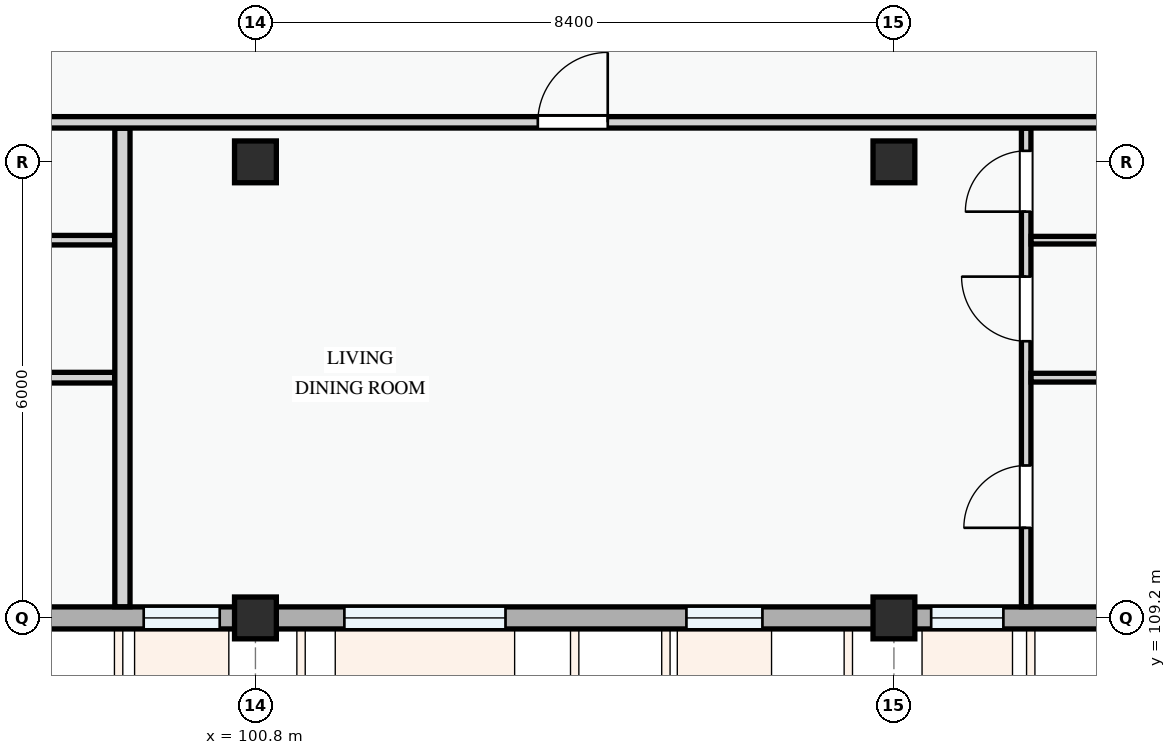
"""IFC4 building model, lengths in metres.
Left out: names, types, materials, properties, quantities, classifications, styles, units other than length and angle.
Written with IfcOpenShell. Run it as: python <this file> out.ifc"""

import sys

from ifc_helpers import new_model, si_unit, direction, frame, frame_2d, origin, origin_2d, place, context, subcontext, project, spatial, rectangle, extrude, element, fill, save


model = new_model("IFC4")
c1 = context("Model", 3, precision=1e-05, world=origin(), true_north=direction((0.0, 1.0)))
c2 = subcontext(c1, "Body", "Model", "MODEL_VIEW")
j1 = project(units=[si_unit("LENGTHUNIT", "METRE"), si_unit("PLANEANGLEUNIT", "RADIAN")], contexts=[c1])
p1 = place(None, origin())
s1 = spatial("IfcSite", under=j1, at=p1, CompositionType="ELEMENT")
p2 = place(p1, origin())
s2 = spatial("IfcBuilding", under=s1, at=p2, CompositionType="ELEMENT")
p3 = place(p2, frame((0.0, 0.0, 24.6)))
s3 = spatial("IfcBuildingStorey", under=s2, at=p3, CompositionType="ELEMENT", Elevation=24.6)
for number, where, z_axis, x_axis in (
    (1, (100.8, 109.2, 0.0), (0.0, 0.0, 1.0), (1.0, 0.0, 0.0)),
    (2, (100.8, 115.2, 0.0), (0.0, 0.0, 1.0), (1.0, 0.0, 0.0)),
    (3, (109.2, 109.2, 0.0), (0.0, 0.0, 1.0), (1.0, 0.0, 0.0)),
    (4, (109.2, 115.2, 0.0), (0.0, 0.0, 1.0), (1.0, 0.0, 0.0)),
):
    element("IfcColumn", number, at=place(p3, frame(where, z_axis=z_axis, x_axis=x_axis)), inside=s3, PredefinedType="COLUMN", context=c2, shape_type="SweptSolid", body=[
        extrude(rectangle(XDim=0.55, YDim=0.55, at=origin_2d()), origin(), (0.0, 0.0, 1.0), 3.3),
    ])
p4 = place(p3, frame((94.8, 109.2, 0.0), z_axis=(0.0, 0.0, 1.0), x_axis=(1.0, 0.0, 0.0)))
e5 = element("IfcWall", 5, at=p4, inside=s3, PredefinedType="STANDARD", context=c2, shape_type="SweptSolid", body=[
    extrude(rectangle(XDim=6.0, YDim=0.29, at=frame_2d((3.0, 0.0))), origin(), (0.0, 0.0, 1.0), 2.475),
])
p5 = place(p4, frame((1.62, 0.0, 0.78)))
e6 = element("IfcOpeningElement", 6, at=p5, cuts=e5, PredefinedType="OPENING", context=c2, shape_type="SweptSolid", body=[
    extrude(rectangle(XDim=1.2, YDim=1.35, at=frame_2d((0.6, 0.675))), frame((0.0, 0.155, 0.0), z_axis=(0.0, -1.0, 0.0), x_axis=(1.0, 0.0, 0.0)), (0.0, 0.0, 1.0), 0.31),
])
p6 = place(p4, frame((4.53, 0.0, 0.78)))
e7 = element("IfcOpeningElement", 7, at=p6, cuts=e5, PredefinedType="OPENING", context=c2, shape_type="SweptSolid", body=[
    extrude(rectangle(XDim=1.0, YDim=1.25, at=frame_2d((0.5, 0.625))), frame((0.0, 0.155, 0.0), z_axis=(0.0, -1.0, 0.0), x_axis=(1.0, 0.0, 0.0)), (0.0, 0.0, 1.0), 0.31),
])
p7 = place(p3, frame((100.8, 109.2, 0.0), z_axis=(0.0, 0.0, 1.0), x_axis=(1.0, 0.0, 0.0)))
e8 = element("IfcWall", 8, at=p7, inside=s3, PredefinedType="STANDARD", context=c2, shape_type="SweptSolid", body=[
    extrude(rectangle(XDim=8.4, YDim=0.29, at=frame_2d((4.2, 0.0))), origin(), (0.0, 0.0, 1.0), 2.375),
])
p8 = place(p7, frame((1.17, 0.0, 0.78)))
e9 = element("IfcOpeningElement", 9, at=p8, cuts=e8, PredefinedType="OPENING", context=c2, shape_type="SweptSolid", body=[
    extrude(rectangle(XDim=2.12, YDim=1.44, at=frame_2d((1.06, 0.72))), frame((0.0, 0.155, 0.0), z_axis=(0.0, -1.0, 0.0), x_axis=(1.0, 0.0, 0.0)), (0.0, 0.0, 1.0), 0.31),
])
p9 = place(p7, frame((5.67, 0.0, 0.78)))
e10 = element("IfcOpeningElement", 10, at=p9, cuts=e8, PredefinedType="OPENING", context=c2, shape_type="SweptSolid", body=[
    extrude(rectangle(XDim=1.0, YDim=1.25, at=frame_2d((0.5, 0.625))), frame((0.0, 0.155, 0.0), z_axis=(0.0, -1.0, 0.0), x_axis=(1.0, 0.0, 0.0)), (0.0, 0.0, 1.0), 0.31),
])
p10 = place(p3, frame((109.2, 109.2, 0.0), z_axis=(0.0, 0.0, 1.0), x_axis=(1.0, 0.0, 0.0)))
e11 = element("IfcWall", 11, at=p10, inside=s3, PredefinedType="STANDARD", context=c2, shape_type="SweptSolid", body=[
    extrude(rectangle(XDim=6.0, YDim=0.29, at=frame_2d((3.0, 0.0))), origin(), (0.0, 0.0, 1.0), 2.475),
])
p11 = place(p10, frame((0.49, 0.0, 0.78)))
e12 = element("IfcOpeningElement", 12, at=p11, cuts=e11, PredefinedType="OPENING", context=c2, shape_type="SweptSolid", body=[
    extrude(rectangle(XDim=0.95, YDim=1.15, at=frame_2d((0.475, 0.575))), frame((0.0, 0.155, 0.0), z_axis=(0.0, -1.0, 0.0), x_axis=(1.0, 0.0, 0.0)), (0.0, 0.0, 1.0), 0.31),
])
p12 = place(p10, frame((2.975, 0.0, 0.78)))
e13 = element("IfcOpeningElement", 13, at=p12, cuts=e11, PredefinedType="OPENING", context=c2, shape_type="SweptSolid", body=[
    extrude(rectangle(XDim=1.6, YDim=1.55, at=frame_2d((0.8, 0.775))), frame((0.0, 0.155, 0.0), z_axis=(0.0, -1.0, 0.0), x_axis=(1.0, 0.0, 0.0)), (0.0, 0.0, 1.0), 0.31),
])
p13 = place(p3, frame((89.807, 112.361, 0.0), z_axis=(0.0, 0.0, 1.0), x_axis=(1.0, 0.0, 0.0)))
e14 = element("IfcWall", 14, at=p13, inside=s3, PredefinedType="PARTITIONING", context=c2, shape_type="SweptSolid", body=[
    extrude(rectangle(XDim=9.141, YDim=0.14, at=frame_2d((4.571, 0.0))), origin(), (0.0, 0.0, 1.0), 3.0),
])
p14 = place(p3, frame((89.807, 114.17, 0.0), z_axis=(0.0, 0.0, 1.0), x_axis=(1.0, 0.0, 0.0)))
e15 = element("IfcWall", 15, at=p14, inside=s3, PredefinedType="PARTITIONING", context=c2, shape_type="SweptSolid", body=[
    extrude(rectangle(XDim=9.141, YDim=0.125, at=frame_2d((4.571, 0.0))), origin(), (0.0, 0.0, 1.0), 3.0),
])
p15 = place(p3, frame((110.94, 109.347, 0.0), z_axis=(0.0, 0.0, 1.0), x_axis=(0.0, 1.0, 0.0)))
e16 = element("IfcWall", 16, at=p15, inside=s3, PredefinedType="PARTITIONING", context=c2, shape_type="SweptSolid", body=[
    extrude(rectangle(XDim=6.296, YDim=0.125, at=frame_2d((3.148, 0.0))), origin(), (0.0, 0.0, 1.0), 3.0),
])
p16 = place(p15, frame((1.038, 0.0, 0.0)))
e17 = element("IfcOpeningElement", 17, at=p16, cuts=e16, PredefinedType="OPENING", context=c2, shape_type="SweptSolid", body=[
    extrude(rectangle(XDim=0.82, YDim=2.08, at=frame_2d((0.41, 1.04))), frame((0.0, 0.073, 0.0), z_axis=(0.0, -1.0, 0.0), x_axis=(1.0, 0.0, 0.0)), (0.0, 0.0, 1.0), 0.145),
])
p17 = place(p15, frame((3.493, 0.0, 0.0)))
e18 = element("IfcOpeningElement", 18, at=p17, cuts=e16, PredefinedType="OPENING", context=c2, shape_type="SweptSolid", body=[
    extrude(rectangle(XDim=0.85, YDim=2.1, at=frame_2d((0.425, 1.05))), frame((0.0, 0.073, 0.0), z_axis=(0.0, -1.0, 0.0), x_axis=(1.0, 0.0, 0.0)), (0.0, 0.0, 1.0), 0.145),
])
p18 = place(p15, frame((5.198, 0.0, 0.0)))
e19 = element("IfcOpeningElement", 19, at=p18, cuts=e16, PredefinedType="OPENING", context=c2, shape_type="SweptSolid", body=[
    extrude(rectangle(XDim=0.8, YDim=2.1, at=frame_2d((0.4, 1.05))), frame((0.0, 0.073, 0.0), z_axis=(0.0, -1.0, 0.0), x_axis=(1.0, 0.0, 0.0)), (0.0, 0.0, 1.0), 0.145),
])
p19 = place(p3, frame((111.004, 112.361, 0.0), z_axis=(0.0, 0.0, 1.0), x_axis=(1.0, 0.0, 0.0)))
e20 = element("IfcWall", 20, at=p19, inside=s3, PredefinedType="PARTITIONING", context=c2, shape_type="SweptSolid", body=[
    extrude(rectangle(XDim=8.331, YDim=0.115, at=frame_2d((4.166, 0.0))), origin(), (0.0, 0.0, 1.0), 3.0),
])
p20 = place(p3, frame((111.004, 114.17, 0.0), z_axis=(0.0, 0.0, 1.0), x_axis=(1.0, 0.0, 0.0)))
e21 = element("IfcWall", 21, at=p20, inside=s3, PredefinedType="PARTITIONING", context=c2, shape_type="SweptSolid", body=[
    extrude(rectangle(XDim=8.331, YDim=0.1, at=frame_2d((4.166, 0.0))), origin(), (0.0, 0.0, 1.0), 3.0),
])
p21 = place(p3, frame((99.05, 109.347, 0.0), z_axis=(0.0, 0.0, 1.0), x_axis=(0.0, 1.0, 0.0)))
e22 = element("IfcWall", 22, at=p21, inside=s3, PredefinedType="PARTITIONING", context=c2, shape_type="SweptSolid", body=[
    extrude(rectangle(XDim=6.296, YDim=0.2, at=frame_2d((3.148, 0.0))), origin(), (0.0, 0.0, 1.0), 3.0),
])
p22 = place(p3, frame((80.547, 115.72, 0.0), z_axis=(0.0, 0.0, 1.0), x_axis=(1.0, 0.0, 0.0)))
e23 = element("IfcWall", 23, at=p22, inside=s3, PredefinedType="PARTITIONING", context=c2, shape_type="SweptSolid", body=[
    extrude(rectangle(XDim=69.503, YDim=0.15, at=frame_2d((34.751, 0.0))), origin(), (0.0, 0.0, 1.0), 3.0),
])
p23 = place(p22, frame((2.367, 0.0, 0.0)))
e24 = element("IfcOpeningElement", 24, at=p23, cuts=e23, PredefinedType="OPENING", context=c2, shape_type="SweptSolid", body=[
    extrude(rectangle(XDim=0.92, YDim=2.1, at=frame_2d((0.46, 1.05))), frame((0.0, 0.085, 0.0), z_axis=(0.0, -1.0, 0.0), x_axis=(1.0, 0.0, 0.0)), (0.0, 0.0, 1.0), 0.17),
])
p24 = place(p22, frame((23.968, 0.0, 0.0)))
e25 = element("IfcOpeningElement", 25, at=p24, cuts=e23, PredefinedType="OPENING", context=c2, shape_type="SweptSolid", body=[
    extrude(rectangle(XDim=0.92, YDim=2.1, at=frame_2d((0.46, 1.05))), frame((0.0, 0.085, 0.0), z_axis=(0.0, -1.0, 0.0), x_axis=(1.0, 0.0, 0.0)), (0.0, 0.0, 1.0), 0.17),
])
p25 = place(p22, frame((39.133, 0.0, 0.0)))
e26 = element("IfcOpeningElement", 26, at=p25, cuts=e23, PredefinedType="OPENING", context=c2, shape_type="SweptSolid", body=[
    extrude(rectangle(XDim=0.92, YDim=2.1, at=frame_2d((0.46, 1.05))), frame((0.0, 0.085, 0.0), z_axis=(0.0, -1.0, 0.0), x_axis=(1.0, 0.0, 0.0)), (0.0, 0.0, 1.0), 0.17),
])
p26 = place(p22, frame((59.909, 0.0, 0.0)))
e27 = element("IfcOpeningElement", 27, at=p26, cuts=e23, PredefinedType="OPENING", context=c2, shape_type="SweptSolid", body=[
    extrude(rectangle(XDim=0.96, YDim=2.12, at=frame_2d((0.48, 1.06))), frame((0.0, 0.085, 0.0), z_axis=(0.0, -1.0, 0.0), x_axis=(1.0, 0.0, 0.0)), (0.0, 0.0, 1.0), 0.17),
])
p27 = place(p6, origin())
e28 = element("IfcWindow", 28, at=p27, inside=s3, PartitioningType="SINGLE_PANEL", PredefinedType="WINDOW", context=c2, shape_type="SweptSolid", body=[
    extrude(rectangle(XDim=1.0, YDim=1.25, at=frame_2d((0.5, 0.625))), frame((0.0, 0.03, 0.0), z_axis=(0.0, -1.0, 0.0), x_axis=(1.0, 0.0, 0.0)), (0.0, 0.0, 1.0), 0.06),
])
fill(e7, e28)
p28 = place(p8, origin())
e29 = element("IfcWindow", 29, at=p28, inside=s3, PartitioningType="DOUBLE_PANEL_VERTICAL", PredefinedType="WINDOW", context=c2, shape_type="SweptSolid", body=[
    extrude(rectangle(XDim=2.12, YDim=1.44, at=frame_2d((1.06, 0.72))), frame((0.0, 0.03, 0.0), z_axis=(0.0, -1.0, 0.0), x_axis=(1.0, 0.0, 0.0)), (0.0, 0.0, 1.0), 0.06),
])
fill(e9, e29)
p29 = place(p9, origin())
e30 = element("IfcWindow", 30, at=p29, inside=s3, PartitioningType="SINGLE_PANEL", PredefinedType="WINDOW", context=c2, shape_type="SweptSolid", body=[
    extrude(rectangle(XDim=1.0, YDim=1.25, at=frame_2d((0.5, 0.625))), frame((0.0, 0.03, 0.0), z_axis=(0.0, -1.0, 0.0), x_axis=(1.0, 0.0, 0.0)), (0.0, 0.0, 1.0), 0.06),
])
fill(e10, e30)
p30 = place(p11, origin())
e31 = element("IfcWindow", 31, at=p30, inside=s3, PartitioningType="SINGLE_PANEL", PredefinedType="WINDOW", context=c2, shape_type="SweptSolid", body=[
    extrude(rectangle(XDim=0.95, YDim=1.15, at=frame_2d((0.475, 0.575))), frame((0.0, 0.03, 0.0), z_axis=(0.0, -1.0, 0.0), x_axis=(1.0, 0.0, 0.0)), (0.0, 0.0, 1.0), 0.06),
])
fill(e12, e31)
p31 = place(p16, origin())
e32 = element("IfcDoor", 32, at=p31, inside=s3, OperationType="SINGLE_SWING_LEFT", PredefinedType="DOOR", context=c2, shape_type="SweptSolid", body=[
    extrude(rectangle(XDim=0.82, YDim=2.08, at=frame_2d((0.41, 1.04))), frame((0.0, 0.025, 0.0), z_axis=(0.0, -1.0, 0.0), x_axis=(1.0, 0.0, 0.0)), (0.0, 0.0, 1.0), 0.05),
])
fill(e17, e32)
p32 = place(p17, origin())
e33 = element("IfcDoor", 33, at=p32, inside=s3, OperationType="SINGLE_SWING_RIGHT", PredefinedType="DOOR", context=c2, shape_type="SweptSolid", body=[
    extrude(rectangle(XDim=0.85, YDim=2.1, at=frame_2d((0.425, 1.05))), frame((0.0, 0.025, 0.0), z_axis=(0.0, -1.0, 0.0), x_axis=(1.0, 0.0, 0.0)), (0.0, 0.0, 1.0), 0.05),
])
fill(e18, e33)
p33 = place(p18, origin())
e34 = element("IfcDoor", 34, at=p33, inside=s3, OperationType="SINGLE_SWING_LEFT", PredefinedType="DOOR", context=c2, shape_type="SweptSolid", body=[
    extrude(rectangle(XDim=0.8, YDim=2.1, at=frame_2d((0.4, 1.05))), frame((0.0, 0.025, 0.0), z_axis=(0.0, -1.0, 0.0), x_axis=(1.0, 0.0, 0.0)), (0.0, 0.0, 1.0), 0.05),
])
fill(e19, e34)
p34 = place(p24, origin())
e35 = element("IfcDoor", 35, at=p34, inside=s3, OperationType="SINGLE_SWING_RIGHT", PredefinedType="DOOR", context=c2, shape_type="SweptSolid", body=[
    extrude(rectangle(XDim=0.92, YDim=2.1, at=frame_2d((0.46, 1.05))), frame((0.0, 0.025, 0.0), z_axis=(0.0, -1.0, 0.0), x_axis=(1.0, 0.0, 0.0)), (0.0, 0.0, 1.0), 0.05),
])
fill(e25, e35)
save(model, sys.argv[1])
